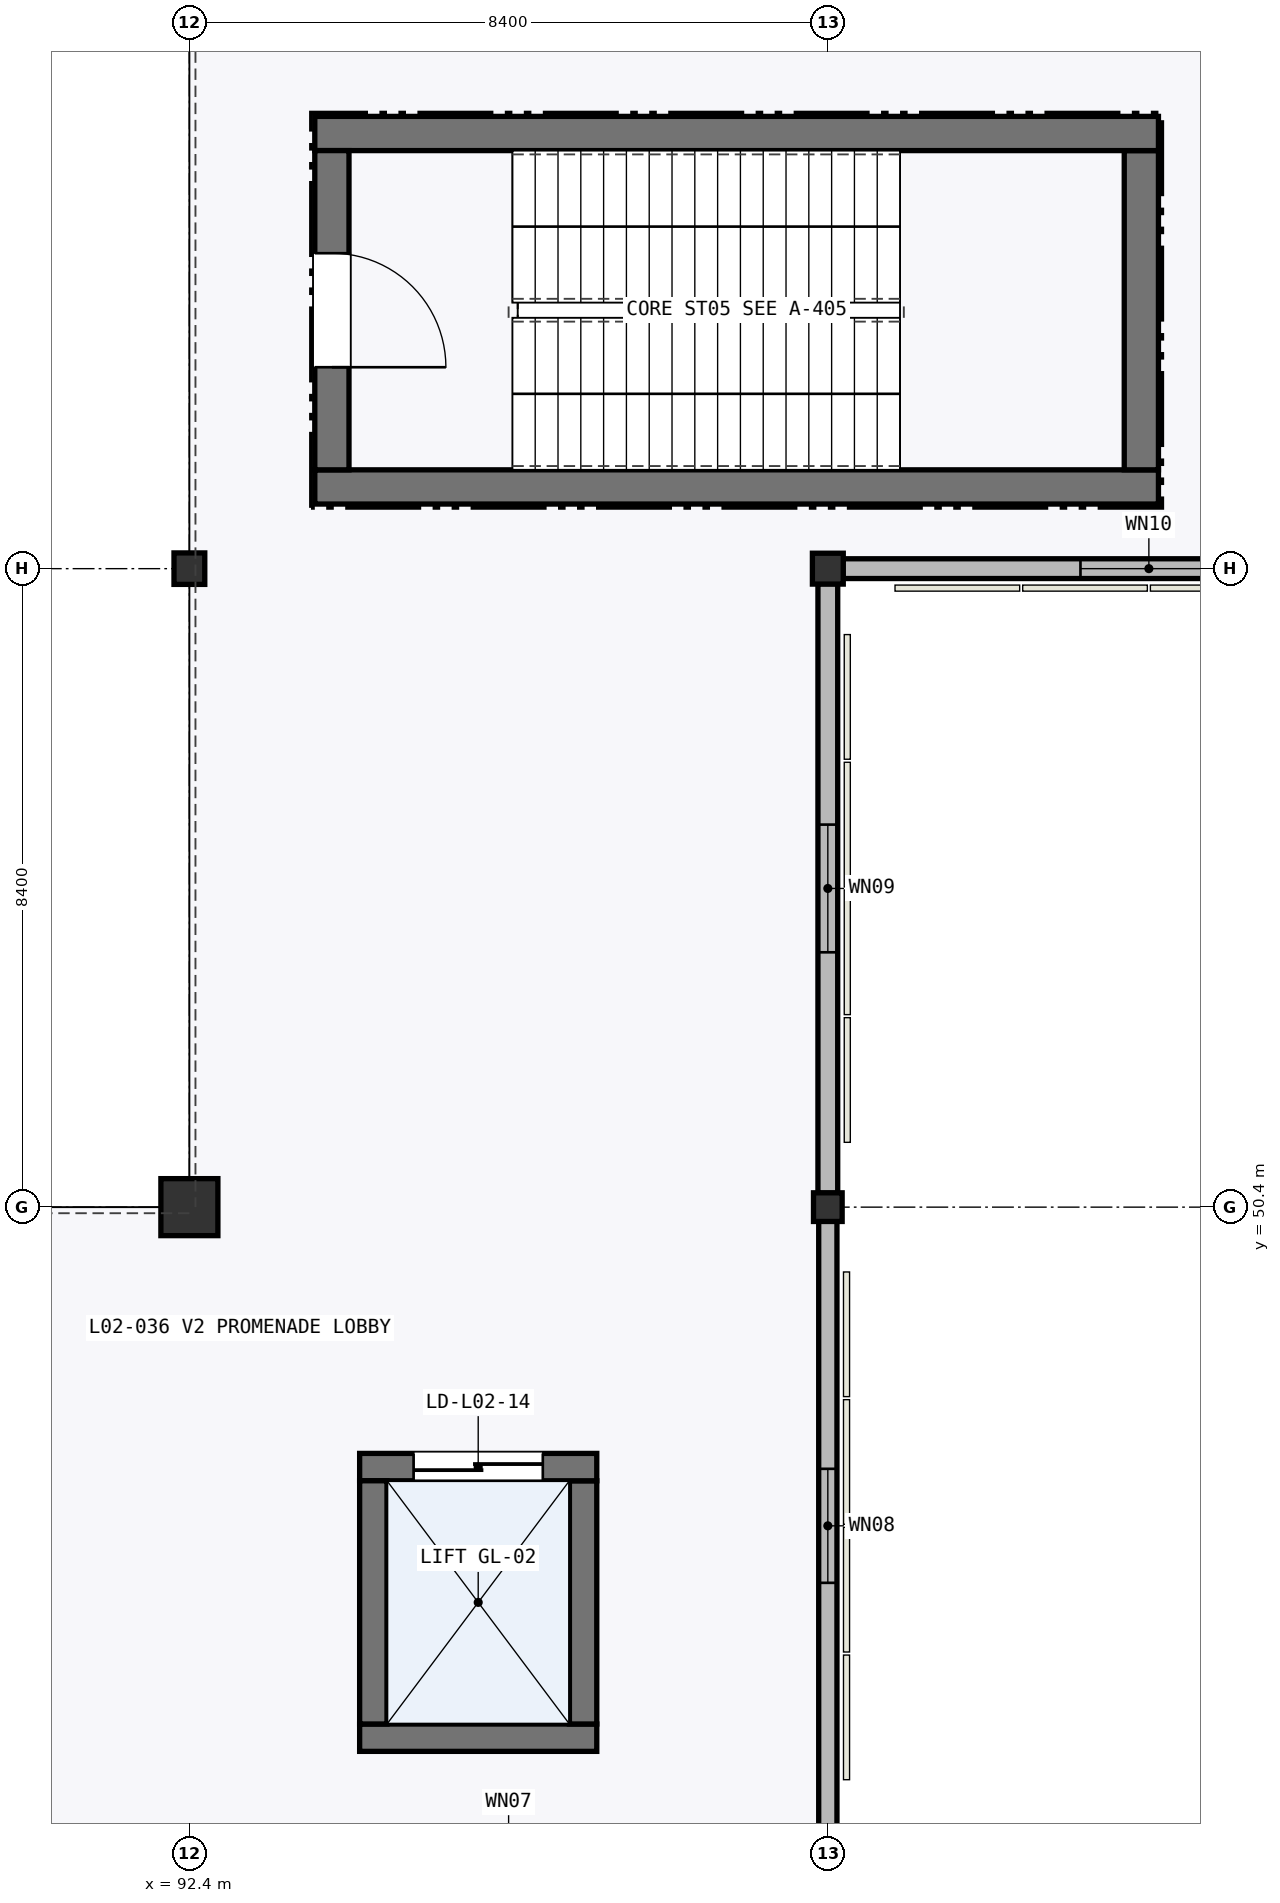
"""IFC4 building model, lengths in metres.
Left out: names, types, materials, properties, quantities, classifications, styles, units other than length and angle.
Written with IfcOpenShell. Run it as: python <this file> out.ifc"""

import sys

from ifc_helpers import new_model, si_unit, direction, frame, frame_2d, origin, origin_2d, place, context, subcontext, project, spatial, rectangle, hollow_circle, i_section, extrude, element, fill, save


model = new_model("IFC4")
c1 = context("Model", 3, precision=1e-05, world=origin(), true_north=direction((0.0, 1.0)))
c2 = subcontext(c1, "Body", "Model", "MODEL_VIEW")
j1 = project(units=[si_unit("LENGTHUNIT", "METRE"), si_unit("PLANEANGLEUNIT", "RADIAN")], contexts=[c1])
p1 = place(None, origin())
s1 = spatial("IfcSite", under=j1, at=p1, CompositionType="ELEMENT")
p2 = place(p1, origin())
s2 = spatial("IfcBuilding", under=s1, at=p2, CompositionType="ELEMENT")
p3 = place(p2, frame((0.0, 0.0, 6.0)))
s3 = spatial("IfcBuildingStorey", under=s2, at=p3, CompositionType="ELEMENT", Elevation=6.0)
p4 = place(p3, frame((92.4, 50.4, 0.0), z_axis=(0.0, 0.0, 1.0), x_axis=(1.0, 0.0, 0.0)))
e1 = element("IfcColumn", 1, at=p4, inside=s3, PredefinedType="COLUMN", context=c2, shape_type="SweptSolid", body=[
    extrude(rectangle(XDim=0.75, YDim=0.75, at=origin_2d()), origin(), (0.0, 0.0, 1.0), 5.4),
])
p5 = place(p3, frame((92.4, 58.8, 0.0), z_axis=(0.0, 0.0, 1.0), x_axis=(1.0, 0.0, 0.0)))
e2 = element("IfcColumn", 2, at=p5, inside=s3, PredefinedType="COLUMN", context=c2, shape_type="SweptSolid", body=[
    extrude(i_section(OverallWidth=0.405, OverallDepth=0.414, WebThickness=0.018, FlangeThickness=0.028, FilletRadius=0.022, at=origin_2d()), origin(), (0.0, 0.0, 1.0), 5.4),
])
p6 = place(p3, frame((100.8, 50.4, 0.0), z_axis=(0.0, 0.0, 1.0), x_axis=(1.0, 0.0, 0.0)))
e3 = element("IfcColumn", 3, at=p6, inside=s3, PredefinedType="COLUMN", context=c2, shape_type="SweptSolid", body=[
    extrude(hollow_circle(Radius=0.188, WallThickness=0.014, at=origin_2d()), origin(), (0.0, 0.0, 1.0), 5.4),
])
p7 = place(p3, frame((100.8, 58.8, 0.0), z_axis=(0.0, 0.0, 1.0), x_axis=(1.0, 0.0, 0.0)))
e4 = element("IfcColumn", 4, at=p7, inside=s3, PredefinedType="COLUMN", context=c2, shape_type="SweptSolid", body=[
    extrude(hollow_circle(Radius=0.203, WallThickness=0.016, at=origin_2d()), origin(), (0.0, 0.0, 1.0), 5.4),
])
p8 = place(p3, frame((100.8, 42.198, 0.0), z_axis=(0.0, 0.0, 1.0), x_axis=(0.0, 1.0, 0.0)))
e5 = element("IfcWall", 5, at=p8, inside=s3, PredefinedType="STANDARD", context=c2, shape_type="SweptSolid", body=[
    extrude(rectangle(XDim=8.019, YDim=0.24, at=frame_2d((4.009, 0.0))), origin(), (0.0, 0.0, 1.0), 4.697),
])
p9 = place(p8, frame((3.259, 0.0, 0.95)))
e6 = element("IfcOpeningElement", 6, at=p9, cuts=e5, PredefinedType="OPENING", context=c2, shape_type="SweptSolid", body=[
    extrude(rectangle(XDim=1.5, YDim=2.1, at=frame_2d((0.75, 1.05))), frame((0.0, 0.13, 0.0), z_axis=(0.0, -1.0, 0.0), x_axis=(1.0, 0.0, 0.0)), (0.0, 0.0, 1.0), 0.26),
])
p10 = place(p3, frame((100.8, 50.583, 0.0), z_axis=(0.0, 0.0, 1.0), x_axis=(0.0, 1.0, 0.0)))
e7 = element("IfcWall", 7, at=p10, inside=s3, PredefinedType="STANDARD", context=c2, shape_type="SweptSolid", body=[
    extrude(rectangle(XDim=8.019, YDim=0.26, at=frame_2d((4.009, 0.0))), origin(), (0.0, 0.0, 1.0), 4.697),
])
p11 = place(p10, frame((3.169, 0.0, 0.95)))
e8 = element("IfcOpeningElement", 8, at=p11, cuts=e7, PredefinedType="OPENING", context=c2, shape_type="SweptSolid", body=[
    extrude(rectangle(XDim=1.68, YDim=2.1, at=frame_2d((0.84, 1.05))), frame((0.0, 0.14, 0.0), z_axis=(0.0, -1.0, 0.0), x_axis=(1.0, 0.0, 0.0)), (0.0, 0.0, 1.0), 0.28),
])
p12 = place(p3, frame((100.998, 58.8, 0.0), z_axis=(0.0, 0.0, 1.0), x_axis=(1.0, 0.0, 0.0)))
e9 = element("IfcWall", 9, at=p12, inside=s3, PredefinedType="STANDARD", context=c2, shape_type="SweptSolid", body=[
    extrude(rectangle(XDim=8.052, YDim=0.26, at=frame_2d((4.026, 0.0))), origin(), (0.0, 0.0, 1.0), 4.697),
])
p13 = place(p12, frame((3.126, 0.0, 0.95)))
e10 = element("IfcOpeningElement", 10, at=p13, cuts=e9, PredefinedType="OPENING", context=c2, shape_type="SweptSolid", body=[
    extrude(rectangle(XDim=1.8, YDim=2.1, at=frame_2d((0.9, 1.05))), frame((0.0, 0.14, 0.0), z_axis=(0.0, -1.0, 0.0), x_axis=(1.0, 0.0, 0.0)), (0.0, 0.0, 1.0), 0.28),
])
p14 = place(p3, frame((94.05, 59.875, 0.0), z_axis=(0.0, 0.0, 1.0), x_axis=(1.0, 0.0, 0.0)))
e11 = element("IfcWall", 11, at=p14, inside=s3, PredefinedType="SHEAR", context=c2, shape_type="SweptSolid", body=[
    extrude(rectangle(XDim=11.1, YDim=0.45, at=frame_2d((5.55, 0.0))), origin(), (0.0, 0.0, 1.0), 5.145),
])
p15 = place(p3, frame((104.925, 60.1, 0.0), z_axis=(0.0, 0.0, 1.0), x_axis=(0.0, 1.0, 0.0)))
e12 = element("IfcWall", 12, at=p15, inside=s3, PredefinedType="SHEAR", context=c2, shape_type="SweptSolid", body=[
    extrude(rectangle(XDim=4.2, YDim=0.45, at=frame_2d((2.1, 0.0))), origin(), (0.0, 0.0, 1.0), 5.145),
])
p16 = place(p3, frame((105.15, 64.525, 0.0), z_axis=(0.0, 0.0, 1.0), x_axis=(-1.0, 0.0, 0.0)))
e13 = element("IfcWall", 13, at=p16, inside=s3, PredefinedType="SHEAR", context=c2, shape_type="SweptSolid", body=[
    extrude(rectangle(XDim=11.1, YDim=0.45, at=frame_2d((5.55, 0.0))), origin(), (0.0, 0.0, 1.0), 5.145),
])
p17 = place(p3, frame((94.275, 64.3, 0.0), z_axis=(0.0, 0.0, 1.0), x_axis=(0.0, -1.0, 0.0)))
e14 = element("IfcWall", 14, at=p17, inside=s3, PredefinedType="SHEAR", context=c2, shape_type="SweptSolid", body=[
    extrude(rectangle(XDim=4.2, YDim=0.45, at=frame_2d((2.1, 0.0))), origin(), (0.0, 0.0, 1.0), 5.145),
])
p18 = place(p17, frame((1.35, 0.0, 0.0)))
e15 = element("IfcOpeningElement", 15, at=p18, cuts=e14, PredefinedType="OPENING", context=c2, shape_type="SweptSolid", body=[
    extrude(rectangle(XDim=1.5, YDim=2.15, at=frame_2d((0.75, 1.075))), frame((0.0, 0.235, 0.0), z_axis=(0.0, -1.0, 0.0), x_axis=(1.0, 0.0, 0.0)), (0.0, 0.0, 1.0), 0.47),
])
p19 = place(p3, frame((94.64, 43.42, 0.0), z_axis=(0.0, 0.0, 1.0), x_axis=(1.0, 0.0, 0.0)))
e16 = element("IfcWall", 16, at=p19, inside=s3, PredefinedType="SHEAR", context=c2, shape_type="SweptSolid", body=[
    extrude(rectangle(XDim=3.12, YDim=0.36, at=frame_2d((1.56, 0.0))), origin(), (0.0, 0.0, 1.0), 5.145),
])
p20 = place(p3, frame((97.58, 43.6, 0.0), z_axis=(0.0, 0.0, 1.0), x_axis=(0.0, 1.0, 0.0)))
e17 = element("IfcWall", 17, at=p20, inside=s3, PredefinedType="SHEAR", context=c2, shape_type="SweptSolid", body=[
    extrude(rectangle(XDim=3.2, YDim=0.36, at=frame_2d((1.6, 0.0))), origin(), (0.0, 0.0, 1.0), 5.145),
])
p21 = place(p3, frame((97.76, 46.98, 0.0), z_axis=(0.0, 0.0, 1.0), x_axis=(-1.0, 0.0, 0.0)))
e18 = element("IfcWall", 18, at=p21, inside=s3, PredefinedType="SHEAR", context=c2, shape_type="SweptSolid", body=[
    extrude(rectangle(XDim=3.12, YDim=0.36, at=frame_2d((1.56, 0.0))), origin(), (0.0, 0.0, 1.0), 5.145),
])
p22 = place(p21, frame((0.71, 0.0, 0.0)))
e19 = element("IfcOpeningElement", 19, at=p22, cuts=e18, PredefinedType="OPENING", context=c2, shape_type="SweptSolid", body=[
    extrude(rectangle(XDim=1.7, YDim=2.3, at=frame_2d((0.85, 1.15))), frame((0.0, 0.19, 0.0), z_axis=(0.0, -1.0, 0.0), x_axis=(1.0, 0.0, 0.0)), (0.0, 0.0, 1.0), 0.38),
])
p23 = place(p3, frame((94.82, 46.8, 0.0), z_axis=(0.0, 0.0, 1.0), x_axis=(0.0, -1.0, 0.0)))
e20 = element("IfcWall", 20, at=p23, inside=s3, PredefinedType="SHEAR", context=c2, shape_type="SweptSolid", body=[
    extrude(rectangle(XDim=3.2, YDim=0.36, at=frame_2d((1.6, 0.0))), origin(), (0.0, 0.0, 1.0), 5.145),
])
p24 = place(p9, origin())
e21 = element("IfcWindow", 21, at=p24, inside=s3, PartitioningType="SINGLE_PANEL", PredefinedType="WINDOW", context=c2, shape_type="SweptSolid", body=[
    extrude(rectangle(XDim=1.5, YDim=2.1, at=frame_2d((0.75, 1.05))), frame((0.0, 0.03, 0.0), z_axis=(0.0, -1.0, 0.0), x_axis=(1.0, 0.0, 0.0)), (0.0, 0.0, 1.0), 0.06),
])
fill(e6, e21)
p25 = place(p11, origin())
e22 = element("IfcWindow", 22, at=p25, inside=s3, PartitioningType="SINGLE_PANEL", PredefinedType="WINDOW", context=c2, shape_type="SweptSolid", body=[
    extrude(rectangle(XDim=1.68, YDim=2.1, at=frame_2d((0.84, 1.05))), frame((0.0, 0.03, 0.0), z_axis=(0.0, -1.0, 0.0), x_axis=(1.0, 0.0, 0.0)), (0.0, 0.0, 1.0), 0.06),
])
fill(e8, e22)
p26 = place(p13, origin())
e23 = element("IfcWindow", 23, at=p26, inside=s3, PartitioningType="SINGLE_PANEL", PredefinedType="WINDOW", context=c2, shape_type="SweptSolid", body=[
    extrude(rectangle(XDim=1.8, YDim=2.1, at=frame_2d((0.9, 1.05))), frame((0.0, 0.03, 0.0), z_axis=(0.0, -1.0, 0.0), x_axis=(1.0, 0.0, 0.0)), (0.0, 0.0, 1.0), 0.06),
])
fill(e10, e23)
p27 = place(p18, origin())
e24 = element("IfcDoor", 24, at=p27, inside=s3, OperationType="SINGLE_SWING_RIGHT", PredefinedType="DOOR", context=c2, shape_type="SweptSolid", body=[
    extrude(rectangle(XDim=1.5, YDim=2.15, at=frame_2d((0.75, 1.075))), frame((0.0, 0.025, 0.0), z_axis=(0.0, -1.0, 0.0), x_axis=(1.0, 0.0, 0.0)), (0.0, 0.0, 1.0), 0.05),
])
fill(e15, e24)
p28 = place(p22, frame((1.7, 0.0, 0.0), z_axis=(0.0, 0.0, 1.0), x_axis=(-1.0, 0.0, 0.0)))
e25 = element("IfcDoor", 25, at=p28, inside=s3, OperationType="DOUBLE_DOOR_SLIDING", PredefinedType="DOOR", context=c2, shape_type="SweptSolid", body=[
    extrude(rectangle(XDim=1.7, YDim=2.3, at=frame_2d((0.85, 1.15))), frame((0.0, 0.025, 0.0), z_axis=(0.0, -1.0, 0.0), x_axis=(1.0, 0.0, 0.0)), (0.0, 0.0, 1.0), 0.05),
])
fill(e19, e25)
save(model, sys.argv[1])
